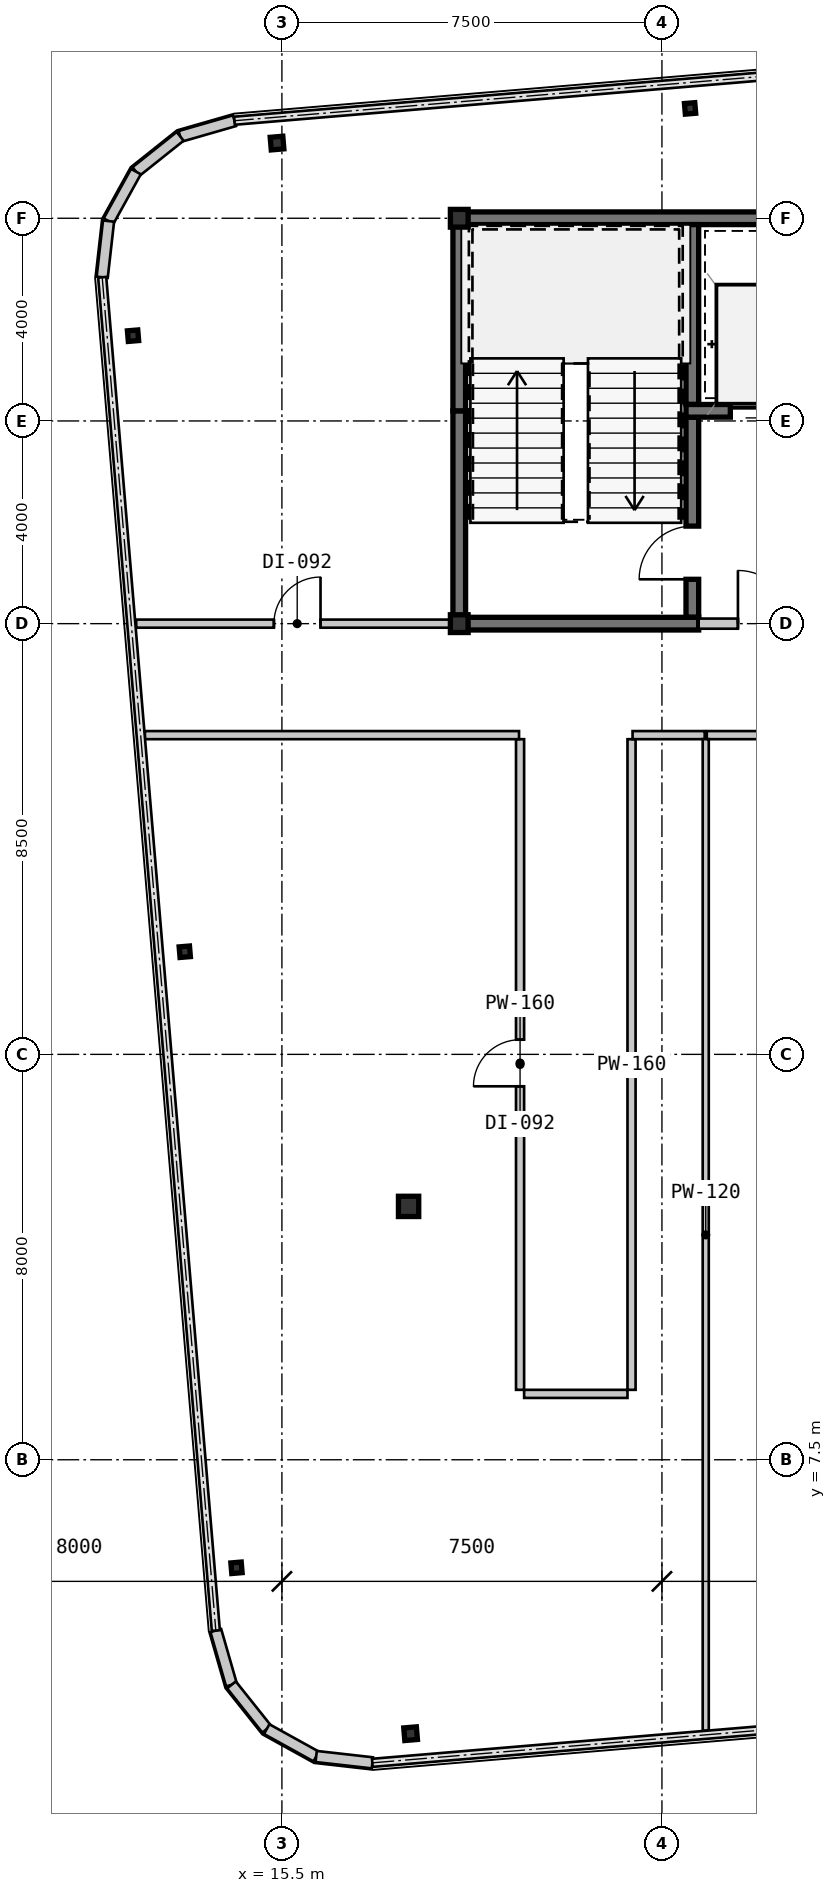
"""IFC4 building model, lengths in metres.
Left out: names, types, materials, properties, quantities, classifications, styles, units other than length and angle.
Written with IfcOpenShell. Run it as: python <this file> out.ifc"""

import sys

from ifc_helpers import new_model, si_unit, direction, frame, frame_2d, origin, origin_2d, place, context, subcontext, project, spatial, rectangle, hollow_rectangle, i_section, extrude, source, transform, mapped, element, fill, save


model = new_model("IFC4")
c1 = context("Model", 3, precision=1e-05, world=origin(), true_north=direction((0.0, 1.0)))
c2 = subcontext(c1, "Body", "Model", "MODEL_VIEW")
j1 = project(units=[si_unit("LENGTHUNIT", "METRE"), si_unit("PLANEANGLEUNIT", "RADIAN")], contexts=[c1])
p1 = place(None, origin())
s1 = spatial("IfcSite", under=j1, at=p1, CompositionType="ELEMENT")
p2 = place(p1, origin())
s2 = spatial("IfcBuilding", under=s1, at=p2, CompositionType="ELEMENT")
p3 = place(p2, frame((0.0, 0.0, 197.75)))
s3 = spatial("IfcBuildingStorey", under=s2, at=p3, CompositionType="ELEMENT", Elevation=197.75)
m1 = source(origin(), c2, "Body", "SweptSolid", [
    extrude(hollow_rectangle(XDim=0.35, YDim=0.35, WallThickness=0.016, at=origin_2d()), origin(), (0.0, 0.0, 1.0), 3.15),
])
for number, where, z_axis, x_axis in (
    (1, (19.0, 24.0, 0.0), (0.0, 0.0, 1.0), (1.0, 0.0, 0.0)),
    (2, (19.0, 32.0, 0.0), (0.0, 0.0, 1.0), (1.0, 0.0, 0.0)),
):
    element("IfcColumn", number, at=place(p3, frame(where, z_axis=z_axis, x_axis=x_axis)), inside=s3, PredefinedType="COLUMN", context=c2, shape_type="MappedRepresentation", body=[
        mapped(m1, transform((0.0, 0.0, 0.0), scale=1.0)),
    ])
m2 = source(origin(), c2, "Body", "SweptSolid", [
    extrude(hollow_rectangle(XDim=0.4, YDim=0.4, WallThickness=0.016, at=origin_2d()), origin(), (0.0, 0.0, 1.0), 3.15),
])
p4 = place(p3, frame((18.0, 12.5, 0.0), z_axis=(0.0, 0.0, 1.0), x_axis=(1.0, 0.0, 0.0)))
e3 = element("IfcColumn", 3, at=p4, inside=s3, PredefinedType="COLUMN", context=c2, shape_type="MappedRepresentation", body=[
    mapped(m2, transform((0.0, 0.0, 0.0), scale=1.0)),
])
m3 = source(origin(), c2, "Body", "SweptSolid", [
    extrude(hollow_rectangle(XDim=0.25, YDim=0.25, WallThickness=0.01, at=origin_2d()), origin(), (0.0, 0.0, 1.0), 3.15),
])
for number, where, z_axis, x_axis in (
    (4, (18.04, 2.094, 0.0), (0.0, 0.0, 1.0), (0.996, 0.084, 0.0)),
    (5, (15.404, 33.484, 0.0), (0.0, 0.0, 1.0), (0.996, 0.084, 0.0)),
):
    element("IfcColumn", number, at=place(p3, frame(where, z_axis=z_axis, x_axis=x_axis)), inside=s3, PredefinedType="COLUMN", context=c2, shape_type="MappedRepresentation", body=[
        mapped(m3, transform((0.0, 0.0, 0.0), scale=1.0)),
    ])
m4 = source(origin(), c2, "Body", "SweptSolid", [
    extrude(i_section(OverallWidth=0.205, OverallDepth=0.21, WebThickness=0.009, FlangeThickness=0.014, at=origin_2d()), origin(), (0.0, 0.0, 1.0), 3.15),
])
for number, where, z_axis, x_axis in (
    (6, (23.555, 34.168, 0.0), (0.0, 0.0, 1.0), (0.996, 0.084, 0.0)),
    (7, (14.604, 5.368, 0.0), (0.0, 0.0, 1.0), (0.996, 0.084, 0.0)),
    (8, (13.583, 17.525, 0.0), (0.0, 0.0, 1.0), (0.996, 0.084, 0.0)),
    (9, (12.562, 29.682, 0.0), (0.0, 0.0, 1.0), (0.996, 0.084, 0.0)),
):
    element("IfcColumn", number, at=place(p3, frame(where, z_axis=z_axis, x_axis=x_axis)), inside=s3, PredefinedType="COLUMN", context=c2, shape_type="MappedRepresentation", body=[
        mapped(m4, transform((0.0, 0.0, 0.0), scale=1.0)),
    ])
m5 = source(origin(), c2, "Body", "SweptSolid", [
    extrude(rectangle(XDim=1.116, YDim=0.22, at=frame_2d((0.558, 0.0))), origin(), (0.0, 0.0, 1.0), 2.93),
])
p5 = place(p3, frame((14.564, 33.925, 0.0), z_axis=(0.0, 0.0, 1.0), x_axis=(-0.961010464297, -0.276512002475, 0.0)))
e10 = element("IfcWall", 10, at=p5, inside=s3, PredefinedType="SOLIDWALL", context=c2, shape_type="MappedRepresentation", body=[
    mapped(m5, transform((0.0, 0.0, 0.0), scale=1.0)),
])
m6 = source(origin(), c2, "Body", "SweptSolid", [
    extrude(rectangle(XDim=1.116, YDim=0.22, at=frame_2d((0.558, 0.0))), origin(), (0.0, 0.0, 1.0), 2.93),
])
p6 = place(p3, frame((13.491, 33.616, 0.0), z_axis=(0.0, 0.0, 1.0), x_axis=(-0.782062884215, -0.623199522732, 0.0)))
e11 = element("IfcWall", 11, at=p6, inside=s3, PredefinedType="SOLIDWALL", context=c2, shape_type="MappedRepresentation", body=[
    mapped(m6, transform((0.0, 0.0, 0.0), scale=1.0)),
])
for number, where, z_axis, x_axis in (
    (12, (12.619, 32.921, 0.0), (0.0, 0.0, 1.0), (-0.484, -0.875, 0.0)),
    (13, (12.079, 31.944, 0.0), (0.0, 0.0, 1.0), (-0.112, -0.994, 0.0)),
    (14, (14.196, 4.13, 0.0), (0.0, 0.0, 1.0), (0.277, -0.961, 0.0)),
    (15, (14.504, 3.057, 0.0), (0.0, 0.0, 1.0), (0.623, -0.782, 0.0)),
    (16, (15.2, 2.184, 0.0), (0.0, 0.0, 1.0), (0.875, -0.484, 0.0)),
    (17, (16.176, 1.644, 0.0), (0.0, 0.0, 1.0), (0.994, -0.112, 0.0)),
):
    element("IfcWall", number, at=place(p3, frame(where, z_axis=z_axis, x_axis=x_axis)), inside=s3, PredefinedType="SOLIDWALL", context=c2, shape_type="MappedRepresentation", body=[
        mapped(m5, transform((0.0, 0.0, 0.0), scale=1.0)),
    ])
m7 = source(origin(), c2, "Body", "SweptSolid", [
    extrude(rectangle(XDim=9.125, YDim=0.25, at=frame_2d((4.562, 0.0))), origin(), (0.0, 0.0, 1.0), 2.93),
])
p7 = place(p3, frame((18.875, 32.0, 0.0), z_axis=(0.0, 0.0, 1.0), x_axis=(1.0, 0.0, 0.0)))
e18 = element("IfcWall", 18, at=p7, inside=s3, PredefinedType="SHEAR", context=c2, shape_type="MappedRepresentation", body=[
    mapped(m7, transform((0.0, 0.0, 0.0), scale=1.0)),
])
m8 = source(origin(), c2, "Body", "SweptSolid", [
    extrude(rectangle(XDim=4.075, YDim=0.25, at=frame_2d((2.038, 0.0))), origin(), (0.0, 0.0, 1.0), 2.93),
])
p8 = place(p3, frame((19.0, 24.125, 0.0), z_axis=(0.0, 0.0, 1.0), x_axis=(0.0, 1.0, 0.0)))
e19 = element("IfcWall", 19, at=p8, inside=s3, PredefinedType="SHEAR", context=c2, shape_type="MappedRepresentation", body=[
    mapped(m8, transform((0.0, 0.0, 0.0), scale=1.0)),
])
m9 = source(origin(), c2, "Body", "SweptSolid", [
    extrude(rectangle(XDim=3.675, YDim=0.25, at=frame_2d((1.837, 0.0))), origin(), (0.0, 0.0, 1.0), 2.93),
])
p9 = place(p3, frame((19.0, 28.2, 0.0), z_axis=(0.0, 0.0, 1.0), x_axis=(0.0, 1.0, 0.0)))
e20 = element("IfcWall", 20, at=p9, inside=s3, PredefinedType="SHEAR", context=c2, shape_type="MappedRepresentation", body=[
    mapped(m9, transform((0.0, 0.0, 0.0), scale=1.0)),
])
m10 = source(origin(), c2, "Body", "SweptSolid", [
    extrude(rectangle(XDim=3.55, YDim=0.25, at=frame_2d((1.775, 0.0))), origin(), (0.0, 0.0, 1.0), 2.93),
])
p10 = place(p3, frame((23.6, 28.325, 0.0), z_axis=(0.0, 0.0, 1.0), x_axis=(0.0, 1.0, 0.0)))
e21 = element("IfcWall", 21, at=p10, inside=s3, PredefinedType="SHEAR", context=c2, shape_type="MappedRepresentation", body=[
    mapped(m10, transform((0.0, 0.0, 0.0), scale=1.0)),
])
m11 = source(origin(), c2, "Body", "SweptSolid", [
    extrude(rectangle(XDim=3.95, YDim=0.25, at=frame_2d((1.975, 0.0))), origin(), (0.0, 0.0, 1.0), 2.93),
])
p11 = place(p3, frame((23.6, 24.125, 0.0), z_axis=(0.0, 0.0, 1.0), x_axis=(0.0, 1.0, 0.0)))
e22 = element("IfcWall", 22, at=p11, inside=s3, PredefinedType="SHEAR", context=c2, shape_type="MappedRepresentation", body=[
    mapped(m11, transform((0.0, 0.0, 0.0), scale=1.0)),
])
m12 = source(origin(), c2, "Body", "SweptSolid", [
    extrude(rectangle(XDim=1.05, YDim=2.1, at=frame_2d((0.525, 1.05))), frame((0.0, 0.135, 0.0), z_axis=(0.0, -1.0, 0.0), x_axis=(1.0, 0.0, 0.0)), (0.0, 0.0, 1.0), 0.27),
])
p12 = place(p11, frame((0.75, 0.0, 0.0)))
e23 = element("IfcOpeningElement", 23, at=p12, cuts=e22, PredefinedType="OPENING", context=c2, shape_type="MappedRepresentation", body=[
    mapped(m12, transform((0.0, 0.0, 0.0), scale=1.0)),
])
m13 = source(origin(), c2, "Body", "SweptSolid", [
    extrude(rectangle(XDim=4.85, YDim=0.25, at=frame_2d((2.425, 0.0))), origin(), (0.0, 0.0, 1.0), 2.93),
])
p13 = place(p3, frame((18.875, 24.0, 0.0), z_axis=(0.0, 0.0, 1.0), x_axis=(1.0, 0.0, 0.0)))
e24 = element("IfcWall", 24, at=p13, inside=s3, PredefinedType="SHEAR", context=c2, shape_type="MappedRepresentation", body=[
    mapped(m13, transform((0.0, 0.0, 0.0), scale=1.0)),
])
m14 = source(origin(), c2, "Body", "SweptSolid", [
    extrude(rectangle(XDim=2.85, YDim=0.25, at=frame_2d((1.425, 0.0))), origin(), (0.0, 0.0, 1.0), 2.93),
])
p14 = place(p3, frame((23.475, 28.2, 0.0), z_axis=(0.0, 0.0, 1.0), x_axis=(1.0, 0.0, 0.0)))
e25 = element("IfcWall", 25, at=p14, inside=s3, PredefinedType="SHEAR", context=c2, shape_type="MappedRepresentation", body=[
    mapped(m14, transform((0.0, 0.0, 0.0), scale=1.0)),
])
m15 = source(origin(), c2, "Body", "SweptSolid", [
    extrude(rectangle(XDim=1.1, YDim=2.15, at=frame_2d((0.55, 1.075))), frame((0.0, 0.135, 0.0), z_axis=(0.0, -1.0, 0.0), x_axis=(1.0, 0.0, 0.0)), (0.0, 0.0, 1.0), 0.27),
])
p15 = place(p14, frame((0.875, 0.0, 0.0)))
e26 = element("IfcOpeningElement", 26, at=p15, cuts=e25, PredefinedType="OPENING", context=c2, shape_type="MappedRepresentation", body=[
    mapped(m15, transform((0.0, 0.0, 0.0), scale=1.0)),
])
m16 = source(origin(), c2, "Body", "SweptSolid", [
    extrude(rectangle(XDim=2.725, YDim=0.2, at=frame_2d((1.362, 0.0))), origin(), (0.0, 0.0, 1.0), 2.47),
])
p16 = place(p3, frame((23.725, 24.0, 0.0), z_axis=(0.0, 0.0, 1.0), x_axis=(1.0, 0.0, 0.0)))
e27 = element("IfcWall", 27, at=p16, inside=s3, PredefinedType="SOLIDWALL", context=c2, shape_type="MappedRepresentation", body=[
    mapped(m16, transform((0.0, 0.0, 0.0), scale=1.0)),
])
m17 = source(origin(), c2, "Body", "SweptSolid", [
    extrude(rectangle(XDim=1.05, YDim=2.1, at=frame_2d((0.525, 1.05))), frame((0.0, 0.11, 0.0), z_axis=(0.0, -1.0, 0.0), x_axis=(1.0, 0.0, 0.0)), (0.0, 0.0, 1.0), 0.22),
])
p17 = place(p16, frame((0.775, 0.0, 0.0)))
e28 = element("IfcOpeningElement", 28, at=p17, cuts=e27, PredefinedType="OPENING", context=c2, shape_type="MappedRepresentation", body=[
    mapped(m17, transform((0.0, 0.0, 0.0), scale=1.0)),
])
m18 = source(origin(), c2, "Body", "SweptSolid", [
    extrude(rectangle(XDim=6.251, YDim=0.16, at=frame_2d((3.125, 0.0))), origin(), (0.0, 0.0, 1.0), 2.93),
])
p18 = place(p3, frame((12.624, 24.0, 0.0), z_axis=(0.0, 0.0, 1.0), x_axis=(1.0, 0.0, 0.0)))
e29 = element("IfcWall", 29, at=p18, inside=s3, PredefinedType="PARTITIONING", context=c2, shape_type="MappedRepresentation", body=[
    mapped(m18, transform((0.0, 0.0, 0.0), scale=1.0)),
])
m19 = source(origin(), c2, "Body", "SweptSolid", [
    extrude(rectangle(XDim=0.92, YDim=2.1, at=frame_2d((0.46, 1.05))), frame((0.0, 0.09, 0.0), z_axis=(0.0, -1.0, 0.0), x_axis=(1.0, 0.0, 0.0)), (0.0, 0.0, 1.0), 0.18),
])
p19 = place(p18, frame((2.718, 0.0, 0.0)))
e30 = element("IfcOpeningElement", 30, at=p19, cuts=e29, PredefinedType="OPENING", context=c2, shape_type="MappedRepresentation", body=[
    mapped(m19, transform((0.0, 0.0, 0.0), scale=1.0)),
])
m20 = source(origin(), c2, "Body", "SweptSolid", [
    extrude(rectangle(XDim=12.84, YDim=0.16, at=frame_2d((6.42, 0.0))), origin(), (0.0, 0.0, 1.0), 2.93),
])
p20 = place(p3, frame((20.2, 8.88, 0.0), z_axis=(0.0, 0.0, 1.0), x_axis=(0.0, 1.0, 0.0)))
e31 = element("IfcWall", 31, at=p20, inside=s3, PredefinedType="PARTITIONING", context=c2, shape_type="MappedRepresentation", body=[
    mapped(m20, transform((0.0, 0.0, 0.0), scale=1.0)),
])
p21 = place(p20, frame((5.99, 0.0, 0.0)))
e32 = element("IfcOpeningElement", 32, at=p21, cuts=e31, PredefinedType="OPENING", context=c2, shape_type="MappedRepresentation", body=[
    mapped(m19, transform((0.0, 0.0, 0.0), scale=1.0)),
])
p22 = place(p3, frame((22.4, 21.72, 0.0), z_axis=(0.0, 0.0, 1.0), x_axis=(0.0, -1.0, 0.0)))
e33 = element("IfcWall", 33, at=p22, inside=s3, PredefinedType="PARTITIONING", context=c2, shape_type="MappedRepresentation", body=[
    mapped(m20, transform((0.0, 0.0, 0.0), scale=1.0)),
])
m21 = source(origin(), c2, "Body", "SweptSolid", [
    extrude(rectangle(XDim=7.384, YDim=0.16, at=frame_2d((3.692, 0.0))), origin(), (0.0, 0.0, 1.0), 2.93),
])
p23 = place(p3, frame((20.18, 21.8, 0.0), z_axis=(0.0, 0.0, 1.0), x_axis=(-1.0, 0.0, 0.0)))
e34 = element("IfcWall", 34, at=p23, inside=s3, PredefinedType="PARTITIONING", context=c2, shape_type="MappedRepresentation", body=[
    mapped(m21, transform((0.0, 0.0, 0.0), scale=1.0)),
])
m22 = source(origin(), c2, "Body", "SweptSolid", [
    extrude(rectangle(XDim=2.04, YDim=0.16, at=frame_2d((1.02, 0.0))), origin(), (0.0, 0.0, 1.0), 2.93),
])
p24 = place(p3, frame((22.32, 8.8, 0.0), z_axis=(0.0, 0.0, 1.0), x_axis=(-1.0, 0.0, 0.0)))
e35 = element("IfcWall", 35, at=p24, inside=s3, PredefinedType="PARTITIONING", context=c2, shape_type="MappedRepresentation", body=[
    mapped(m22, transform((0.0, 0.0, 0.0), scale=1.0)),
])
m23 = source(origin(), c2, "Body", "SweptSolid", [
    extrude(rectangle(XDim=1.424, YDim=0.16, at=frame_2d((0.712, 0.0))), origin(), (0.0, 0.0, 1.0), 2.93),
])
p25 = place(p3, frame((23.844, 21.8, 0.0), z_axis=(0.0, 0.0, 1.0), x_axis=(-1.0, 0.0, 0.0)))
e36 = element("IfcWall", 36, at=p25, inside=s3, PredefinedType="PARTITIONING", context=c2, shape_type="MappedRepresentation", body=[
    mapped(m23, transform((0.0, 0.0, 0.0), scale=1.0)),
])
m24 = source(origin(), c2, "Body", "SweptSolid", [
    extrude(rectangle(XDim=11.095, YDim=0.16, at=frame_2d((5.547, 0.0))), origin(), (0.0, 0.0, 1.0), 2.93),
])
p26 = place(p3, frame((34.98, 21.8, 0.0), z_axis=(0.0, 0.0, 1.0), x_axis=(-1.0, 0.0, 0.0)))
e37 = element("IfcWall", 37, at=p26, inside=s3, PredefinedType="PARTITIONING", context=c2, shape_type="MappedRepresentation", body=[
    mapped(m24, transform((0.0, 0.0, 0.0), scale=1.0)),
])
p27 = place(p26, frame((5.087, 0.0, 0.0)))
e38 = element("IfcOpeningElement", 38, at=p27, cuts=e37, PredefinedType="OPENING", context=c2, shape_type="MappedRepresentation", body=[
    mapped(m19, transform((0.0, 0.0, 0.0), scale=1.0)),
])
m25 = source(origin(), c2, "Body", "SweptSolid", [
    extrude(rectangle(XDim=19.565, YDim=0.12, at=frame_2d((9.782, 0.0))), origin(), (0.0, 0.0, 1.0), 2.93),
])
p28 = place(p3, frame((23.865, 21.72, 0.0), z_axis=(0.0, 0.0, 1.0), x_axis=(0.0, -1.0, 0.0)))
e39 = element("IfcWall", 39, at=p28, inside=s3, PredefinedType="PARTITIONING", context=c2, shape_type="MappedRepresentation", body=[
    mapped(m25, transform((0.0, 0.0, 0.0), scale=1.0)),
])
m26 = source(origin(), c2, "Body", "SweptSolid", [
    extrude(rectangle(XDim=1.05, YDim=2.1, at=frame_2d((0.525, 1.05))), frame((0.0, 0.025, 0.0), z_axis=(0.0, -1.0, 0.0), x_axis=(1.0, 0.0, 0.0)), (0.0, 0.0, 1.0), 0.05),
])
p29 = place(p12, origin())
e40 = element("IfcDoor", 40, at=p29, inside=s3, OperationType="SINGLE_SWING_LEFT", PredefinedType="DOOR", context=c2, shape_type="MappedRepresentation", body=[
    mapped(m26, transform((0.0, 0.0, 0.0), scale=1.0)),
])
fill(e23, e40)
m27 = source(origin(), c2, "Body", "SweptSolid", [
    extrude(rectangle(XDim=1.1, YDim=2.15, at=frame_2d((0.55, 1.075))), frame((0.0, 0.025, 0.0), z_axis=(0.0, -1.0, 0.0), x_axis=(1.0, 0.0, 0.0)), (0.0, 0.0, 1.0), 0.05),
])
p30 = place(p15, origin())
e41 = element("IfcDoor", 41, at=p30, inside=s3, OperationType="SLIDING_TO_LEFT", PredefinedType="DOOR", context=c2, shape_type="MappedRepresentation", body=[
    mapped(m27, transform((0.0, 0.0, 0.0), scale=1.0)),
])
fill(e26, e41)
p31 = place(p17, origin())
e42 = element("IfcDoor", 42, at=p31, inside=s3, OperationType="SINGLE_SWING_LEFT", PredefinedType="DOOR", context=c2, shape_type="MappedRepresentation", body=[
    mapped(m26, transform((0.0, 0.0, 0.0), scale=1.0)),
])
fill(e28, e42)
m28 = source(origin(), c2, "Body", "SweptSolid", [
    extrude(rectangle(XDim=0.92, YDim=2.1, at=frame_2d((0.46, 1.05))), frame((0.0, 0.025, 0.0), z_axis=(0.0, -1.0, 0.0), x_axis=(1.0, 0.0, 0.0)), (0.0, 0.0, 1.0), 0.05),
])
p32 = place(p19, origin())
e43 = element("IfcDoor", 43, at=p32, inside=s3, OperationType="SINGLE_SWING_RIGHT", PredefinedType="DOOR", context=c2, shape_type="MappedRepresentation", body=[
    mapped(m28, transform((0.0, 0.0, 0.0), scale=1.0)),
])
fill(e30, e43)
p33 = place(p21, origin())
e44 = element("IfcDoor", 44, at=p33, inside=s3, OperationType="SINGLE_SWING_LEFT", PredefinedType="DOOR", context=c2, shape_type="MappedRepresentation", body=[
    mapped(m28, transform((0.0, 0.0, 0.0), scale=1.0)),
])
fill(e32, e44)
save(model, sys.argv[1])
